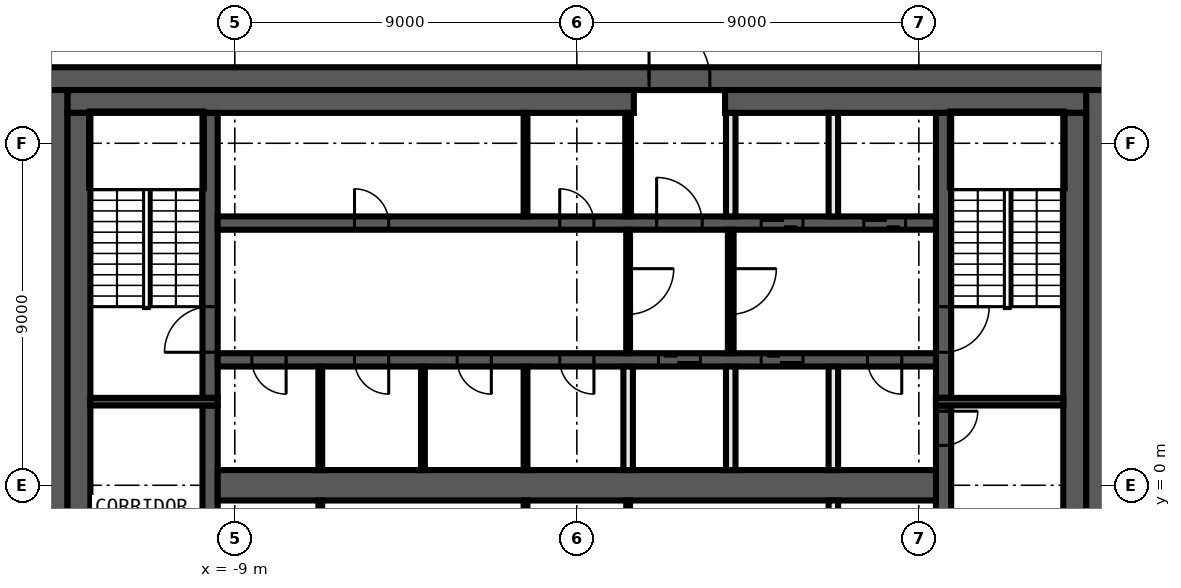
"""IFC4 building model, lengths in metres.
Left out: names, types, materials, properties, quantities, classifications, styles, units other than length and angle.
Written with IfcOpenShell. Run it as: python <this file> out.ifc"""

import sys

from ifc_helpers import new_model, si_unit, direction, frame, frame_2d, origin, place, context, subcontext, project, spatial, rectangle, extrude, element, fill, save


model = new_model("IFC4")
c1 = context("Model", 3, precision=1e-05, world=origin(), true_north=direction((0.0, 1.0)))
c2 = subcontext(c1, "Body", "Model", "MODEL_VIEW")
j1 = project(units=[si_unit("LENGTHUNIT", "METRE"), si_unit("PLANEANGLEUNIT", "RADIAN")], contexts=[c1])
p1 = place(None, origin())
s1 = spatial("IfcSite", under=j1, at=p1, CompositionType="ELEMENT")
p2 = place(p1, origin())
s2 = spatial("IfcBuilding", under=s1, at=p2, CompositionType="ELEMENT")
p3 = place(p2, frame((0.0, 0.0, 332.0)))
s3 = spatial("IfcBuildingStorey", under=s2, at=p3, CompositionType="ELEMENT", Elevation=332.0)
p4 = place(p3, frame((-14.0, 10.7, 0.0), z_axis=(0.0, 0.0, 1.0), x_axis=(1.0, 0.0, 0.0)))
e1 = element("IfcWall", 1, at=p4, inside=s3, PredefinedType="SHEAR", context=c2, shape_type="SweptSolid", body=[
    extrude(rectangle(XDim=28.0, YDim=0.6, at=frame_2d((14.0, 0.0))), origin(), (0.0, 0.0, 1.0), 3.82),
])
p5 = place(p4, frame((15.9, 0.0, 0.0)))
e2 = element("IfcOpeningElement", 2, at=p5, cuts=e1, PredefinedType="OPENING", context=c2, shape_type="SweptSolid", body=[
    extrude(rectangle(XDim=1.6, YDim=2.1, at=frame_2d((0.8, 1.05))), frame((0.0, 0.31, 0.0), z_axis=(0.0, -1.0, 0.0), x_axis=(1.0, 0.0, 0.0)), (0.0, 0.0, 1.0), 0.62),
])
for number, where, z_axis, x_axis in (
    (3, (13.7, 10.4, 0.0), (0.0, 0.0, 1.0), (0.0, -1.0, 0.0)),
    (4, (-13.7, -10.4, 0.0), (0.0, 0.0, 1.0), (0.0, 1.0, 0.0)),
):
    element("IfcWall", number, at=place(p3, frame(where, z_axis=z_axis, x_axis=x_axis)), inside=s3, PredefinedType="SHEAR", context=c2, shape_type="SweptSolid", body=[
        extrude(rectangle(XDim=20.8, YDim=0.6, at=frame_2d((10.4, 0.0))), origin(), (0.0, 0.0, 1.0), 3.82),
    ])
p6 = place(p3, frame((-13.4, 10.1, 0.0), z_axis=(0.0, 0.0, 1.0), x_axis=(1.0, 0.0, 0.0)))
e5 = element("IfcWall", 5, at=p6, inside=s3, PredefinedType="SHEAR", context=c2, shape_type="SweptSolid", body=[
    extrude(rectangle(XDim=14.9, YDim=0.6, at=frame_2d((7.45, 0.0))), origin(), (0.0, 0.0, 1.0), 3.82),
])
p7 = place(p3, frame((3.9, 10.1, 0.0), z_axis=(0.0, 0.0, 1.0), x_axis=(1.0, 0.0, 0.0)))
e6 = element("IfcWall", 6, at=p7, inside=s3, PredefinedType="SHEAR", context=c2, shape_type="SweptSolid", body=[
    extrude(rectangle(XDim=9.5, YDim=0.6, at=frame_2d((4.75, 0.0))), origin(), (0.0, 0.0, 1.0), 3.82),
])
for number, where, z_axis, x_axis in (
    (7, (13.1, 9.8, 0.0), (0.0, 0.0, 1.0), (0.0, -1.0, 0.0)),
    (8, (-13.1, -9.8, 0.0), (0.0, 0.0, 1.0), (0.0, 1.0, 0.0)),
):
    element("IfcWall", number, at=place(p3, frame(where, z_axis=z_axis, x_axis=x_axis)), inside=s3, PredefinedType="SHEAR", context=c2, shape_type="SweptSolid", body=[
        extrude(rectangle(XDim=19.6, YDim=0.6, at=frame_2d((9.8, 0.0))), origin(), (0.0, 0.0, 1.0), 3.82),
    ])
p8 = place(p3, frame((9.65, 2.1, 0.0), z_axis=(0.0, 0.0, 1.0), x_axis=(0.0, -1.0, 0.0)))
e9 = element("IfcWall", 9, at=p8, inside=s3, PredefinedType="SHEAR", context=c2, shape_type="SweptSolid", body=[
    extrude(rectangle(XDim=4.2, YDim=0.4, at=frame_2d((2.1, 0.0))), origin(), (0.0, 0.0, 1.0), 3.82),
])
p9 = place(p8, frame((0.15, 0.0, 0.0)))
e10 = element("IfcOpeningElement", 10, at=p9, cuts=e9, PredefinedType="OPENING", context=c2, shape_type="SweptSolid", body=[
    extrude(rectangle(XDim=0.9, YDim=2.1, at=frame_2d((0.45, 1.05))), frame((0.0, 0.21, 0.0), z_axis=(0.0, -1.0, 0.0), x_axis=(1.0, 0.0, 0.0)), (0.0, 0.0, 1.0), 0.42),
])
p10 = place(p3, frame((9.65, 9.8, 0.0), z_axis=(0.0, 0.0, 1.0), x_axis=(0.0, -1.0, 0.0)))
e11 = element("IfcWall", 11, at=p10, inside=s3, PredefinedType="SHEAR", context=c2, shape_type="SweptSolid", body=[
    extrude(rectangle(XDim=7.5, YDim=0.4, at=frame_2d((3.75, 0.0))), origin(), (0.0, 0.0, 1.0), 3.82),
])
p11 = place(p10, frame((5.1, 0.0, 0.0)))
e12 = element("IfcOpeningElement", 12, at=p11, cuts=e11, PredefinedType="OPENING", context=c2, shape_type="SweptSolid", body=[
    extrude(rectangle(XDim=1.2, YDim=2.1, at=frame_2d((0.6, 1.05))), frame((0.0, 0.21, 0.0), z_axis=(0.0, -1.0, 0.0), x_axis=(1.0, 0.0, 0.0)), (0.0, 0.0, 1.0), 0.42),
])
p12 = place(p3, frame((-9.65, -2.1, 0.0), z_axis=(0.0, 0.0, 1.0), x_axis=(0.0, 1.0, 0.0)))
e13 = element("IfcWall", 13, at=p12, inside=s3, PredefinedType="SHEAR", context=c2, shape_type="SweptSolid", body=[
    extrude(rectangle(XDim=4.2, YDim=0.4, at=frame_2d((2.1, 0.0))), origin(), (0.0, 0.0, 1.0), 3.82),
])
p13 = place(p3, frame((-9.65, 2.3, 0.0), z_axis=(0.0, 0.0, 1.0), x_axis=(0.0, 1.0, 0.0)))
e14 = element("IfcWall", 14, at=p13, inside=s3, PredefinedType="SHEAR", context=c2, shape_type="SweptSolid", body=[
    extrude(rectangle(XDim=7.5, YDim=0.4, at=frame_2d((3.75, 0.0))), origin(), (0.0, 0.0, 1.0), 3.82),
])
p14 = place(p13, frame((1.2, 0.0, 0.0)))
e15 = element("IfcOpeningElement", 15, at=p14, cuts=e14, PredefinedType="OPENING", context=c2, shape_type="SweptSolid", body=[
    extrude(rectangle(XDim=1.2, YDim=2.1, at=frame_2d((0.6, 1.05))), frame((0.0, 0.21, 0.0), z_axis=(0.0, -1.0, 0.0), x_axis=(1.0, 0.0, 0.0)), (0.0, 0.0, 1.0), 0.42),
])
for number, where, z_axis, x_axis in (
    (16, (9.45, 2.2, 0.0), (0.0, 0.0, 1.0), (1.0, 0.0, 0.0)),
    (17, (-9.45, 2.2, 0.0), (0.0, 0.0, 1.0), (-1.0, 0.0, 0.0)),
):
    element("IfcWall", number, at=place(p3, frame(where, z_axis=z_axis, x_axis=x_axis)), inside=s3, PredefinedType="SHEAR", context=c2, shape_type="SweptSolid", body=[
        extrude(rectangle(XDim=3.35, YDim=0.2, at=frame_2d((1.675, 0.0))), origin(), (0.0, 0.0, 1.0), 3.82),
    ])
p15 = place(p3, frame((-9.45, 6.9, 0.0), z_axis=(0.0, 0.0, 1.0), x_axis=(1.0, 0.0, 0.0)))
e18 = element("IfcWall", 18, at=p15, inside=s3, PredefinedType="SHEAR", context=c2, shape_type="SweptSolid", body=[
    extrude(rectangle(XDim=18.9, YDim=0.35, at=frame_2d((9.45, 0.0))), origin(), (0.0, 0.0, 1.0), 3.82),
])
p16 = place(p15, frame((11.55, 0.0, 0.0)))
e19 = element("IfcOpeningElement", 19, at=p16, cuts=e18, PredefinedType="OPENING", context=c2, shape_type="SweptSolid", body=[
    extrude(rectangle(XDim=1.2, YDim=2.1, at=frame_2d((0.6, 1.05))), frame((0.0, 0.185, 0.0), z_axis=(0.0, -1.0, 0.0), x_axis=(1.0, 0.0, 0.0)), (0.0, 0.0, 1.0), 0.37),
])
p17 = place(p15, frame((14.3, 0.0, 0.0)))
e20 = element("IfcOpeningElement", 20, at=p17, cuts=e18, PredefinedType="OPENING", context=c2, shape_type="SweptSolid", body=[
    extrude(rectangle(XDim=1.1, YDim=2.1, at=frame_2d((0.55, 1.05))), frame((0.0, 0.185, 0.0), z_axis=(0.0, -1.0, 0.0), x_axis=(1.0, 0.0, 0.0)), (0.0, 0.0, 1.0), 0.37),
])
p18 = place(p15, frame((17.0, 0.0, 0.0)))
e21 = element("IfcOpeningElement", 21, at=p18, cuts=e18, PredefinedType="OPENING", context=c2, shape_type="SweptSolid", body=[
    extrude(rectangle(XDim=1.1, YDim=2.1, at=frame_2d((0.55, 1.05))), frame((0.0, 0.185, 0.0), z_axis=(0.0, -1.0, 0.0), x_axis=(1.0, 0.0, 0.0)), (0.0, 0.0, 1.0), 0.37),
])
p19 = place(p15, frame((3.6, 0.0, 0.0)))
e22 = element("IfcOpeningElement", 22, at=p19, cuts=e18, PredefinedType="OPENING", context=c2, shape_type="SweptSolid", body=[
    extrude(rectangle(XDim=0.9, YDim=2.1, at=frame_2d((0.45, 1.05))), frame((0.0, 0.185, 0.0), z_axis=(0.0, -1.0, 0.0), x_axis=(1.0, 0.0, 0.0)), (0.0, 0.0, 1.0), 0.37),
])
p20 = place(p15, frame((9.0, 0.0, 0.0)))
e23 = element("IfcOpeningElement", 23, at=p20, cuts=e18, PredefinedType="OPENING", context=c2, shape_type="SweptSolid", body=[
    extrude(rectangle(XDim=0.9, YDim=2.1, at=frame_2d((0.45, 1.05))), frame((0.0, 0.185, 0.0), z_axis=(0.0, -1.0, 0.0), x_axis=(1.0, 0.0, 0.0)), (0.0, 0.0, 1.0), 0.37),
])
p21 = place(p3, frame((9.45, 3.3, 0.0), z_axis=(0.0, 0.0, 1.0), x_axis=(-1.0, 0.0, 0.0)))
e24 = element("IfcWall", 24, at=p21, inside=s3, PredefinedType="SHEAR", context=c2, shape_type="SweptSolid", body=[
    extrude(rectangle(XDim=18.9, YDim=0.35, at=frame_2d((9.45, 0.0))), origin(), (0.0, 0.0, 1.0), 3.82),
])
p22 = place(p21, frame((6.2, 0.0, 0.0)))
e25 = element("IfcOpeningElement", 25, at=p22, cuts=e24, PredefinedType="OPENING", context=c2, shape_type="SweptSolid", body=[
    extrude(rectangle(XDim=1.1, YDim=2.1, at=frame_2d((0.55, 1.05))), frame((0.0, 0.185, 0.0), z_axis=(0.0, -1.0, 0.0), x_axis=(1.0, 0.0, 0.0)), (0.0, 0.0, 1.0), 0.37),
])
p23 = place(p21, frame((3.5, 0.0, 0.0)))
e26 = element("IfcOpeningElement", 26, at=p23, cuts=e24, PredefinedType="OPENING", context=c2, shape_type="SweptSolid", body=[
    extrude(rectangle(XDim=1.1, YDim=2.1, at=frame_2d((0.55, 1.05))), frame((0.0, 0.185, 0.0), z_axis=(0.0, -1.0, 0.0), x_axis=(1.0, 0.0, 0.0)), (0.0, 0.0, 1.0), 0.37),
])
p24 = place(p21, frame((0.9, 0.0, 0.0)))
e27 = element("IfcOpeningElement", 27, at=p24, cuts=e24, PredefinedType="OPENING", context=c2, shape_type="SweptSolid", body=[
    extrude(rectangle(XDim=0.9, YDim=2.1, at=frame_2d((0.45, 1.05))), frame((0.0, 0.185, 0.0), z_axis=(0.0, -1.0, 0.0), x_axis=(1.0, 0.0, 0.0)), (0.0, 0.0, 1.0), 0.37),
])
p25 = place(p21, frame((17.1, 0.0, 0.0)))
e28 = element("IfcOpeningElement", 28, at=p25, cuts=e24, PredefinedType="OPENING", context=c2, shape_type="SweptSolid", body=[
    extrude(rectangle(XDim=0.9, YDim=2.1, at=frame_2d((0.45, 1.05))), frame((0.0, 0.185, 0.0), z_axis=(0.0, -1.0, 0.0), x_axis=(1.0, 0.0, 0.0)), (0.0, 0.0, 1.0), 0.37),
])
p26 = place(p21, frame((14.4, 0.0, 0.0)))
e29 = element("IfcOpeningElement", 29, at=p26, cuts=e24, PredefinedType="OPENING", context=c2, shape_type="SweptSolid", body=[
    extrude(rectangle(XDim=0.9, YDim=2.1, at=frame_2d((0.45, 1.05))), frame((0.0, 0.185, 0.0), z_axis=(0.0, -1.0, 0.0), x_axis=(1.0, 0.0, 0.0)), (0.0, 0.0, 1.0), 0.37),
])
p27 = place(p21, frame((11.7, 0.0, 0.0)))
e30 = element("IfcOpeningElement", 30, at=p27, cuts=e24, PredefinedType="OPENING", context=c2, shape_type="SweptSolid", body=[
    extrude(rectangle(XDim=0.9, YDim=2.1, at=frame_2d((0.45, 1.05))), frame((0.0, 0.185, 0.0), z_axis=(0.0, -1.0, 0.0), x_axis=(1.0, 0.0, 0.0)), (0.0, 0.0, 1.0), 0.37),
])
p28 = place(p21, frame((9.0, 0.0, 0.0)))
e31 = element("IfcOpeningElement", 31, at=p28, cuts=e24, PredefinedType="OPENING", context=c2, shape_type="SweptSolid", body=[
    extrude(rectangle(XDim=0.9, YDim=2.1, at=frame_2d((0.45, 1.05))), frame((0.0, 0.185, 0.0), z_axis=(0.0, -1.0, 0.0), x_axis=(1.0, 0.0, 0.0)), (0.0, 0.0, 1.0), 0.37),
])
p29 = place(p3, frame((-9.45, 0.0, 0.0), z_axis=(0.0, 0.0, 1.0), x_axis=(1.0, 0.0, 0.0)))
e32 = element("IfcWall", 32, at=p29, inside=s3, PredefinedType="SHEAR", context=c2, shape_type="SweptSolid", body=[
    extrude(rectangle(XDim=18.9, YDim=0.8, at=frame_2d((9.45, 0.0))), origin(), (0.0, 0.0, 1.0), 3.82),
])
for number, where, z_axis, x_axis in (
    (33, (6.75, -3.125, 0.0), (0.0, 0.0, 1.0), (0.0, 1.0, 0.0)),
    (34, (6.75, 0.4, 0.0), (0.0, 0.0, 1.0), (0.0, 1.0, 0.0)),
    (35, (6.75, 7.075, 0.0), (0.0, 0.0, 1.0), (0.0, 1.0, 0.0)),
):
    element("IfcWall", number, at=place(p3, frame(where, z_axis=z_axis, x_axis=x_axis)), inside=s3, PredefinedType="SOLIDWALL", context=c2, shape_type="SweptSolid", body=[
        extrude(rectangle(XDim=2.725, YDim=0.25, at=frame_2d((1.363, 0.0))), origin(), (0.0, 0.0, 1.0), 3.82),
    ])
p30 = place(p3, frame((4.05, 6.725, 0.0), z_axis=(0.0, 0.0, 1.0), x_axis=(0.0, -1.0, 0.0)))
e36 = element("IfcWall", 36, at=p30, inside=s3, PredefinedType="PARTITIONING", context=c2, shape_type="SweptSolid", body=[
    extrude(rectangle(XDim=3.25, YDim=0.15, at=frame_2d((1.625, 0.0))), origin(), (0.0, 0.0, 1.0), 3.82),
])
p31 = place(p30, frame((1.025, 0.0, 0.0)))
e37 = element("IfcOpeningElement", 37, at=p31, cuts=e36, PredefinedType="OPENING", context=c2, shape_type="SweptSolid", body=[
    extrude(rectangle(XDim=1.2, YDim=2.1, at=frame_2d((0.6, 1.05))), frame((0.0, 0.085, 0.0), z_axis=(0.0, -1.0, 0.0), x_axis=(1.0, 0.0, 0.0)), (0.0, 0.0, 1.0), 0.17),
])
for number, where, z_axis, x_axis in (
    (38, (4.05, 0.4, 0.0), (0.0, 0.0, 1.0), (0.0, 1.0, 0.0)),
    (39, (4.05, 7.075, 0.0), (0.0, 0.0, 1.0), (0.0, 1.0, 0.0)),
):
    element("IfcWall", number, at=place(p3, frame(where, z_axis=z_axis, x_axis=x_axis)), inside=s3, PredefinedType="SOLIDWALL", context=c2, shape_type="SweptSolid", body=[
        extrude(rectangle(XDim=2.725, YDim=0.25, at=frame_2d((1.363, 0.0))), origin(), (0.0, 0.0, 1.0), 3.82),
    ])
p32 = place(p3, frame((1.35, 7.075, 0.0), z_axis=(0.0, 0.0, 1.0), x_axis=(0.0, 1.0, 0.0)))
e40 = element("IfcWall", 40, at=p32, inside=s3, PredefinedType="PARTITIONING", context=c2, shape_type="SweptSolid", body=[
    extrude(rectangle(XDim=2.725, YDim=0.15, at=frame_2d((1.363, 0.0))), origin(), (0.0, 0.0, 1.0), 3.82),
])
p33 = place(p3, frame((1.35, -3.125, 0.0), z_axis=(0.0, 0.0, 1.0), x_axis=(0.0, 1.0, 0.0)))
e41 = element("IfcWall", 41, at=p33, inside=s3, PredefinedType="PARTITIONING", context=c2, shape_type="SweptSolid", body=[
    extrude(rectangle(XDim=2.725, YDim=0.1, at=frame_2d((1.363, 0.0))), origin(), (0.0, 0.0, 1.0), 3.82),
])
p34 = place(p3, frame((1.35, 6.725, 0.0), z_axis=(0.0, 0.0, 1.0), x_axis=(0.0, -1.0, 0.0)))
e42 = element("IfcWall", 42, at=p34, inside=s3, PredefinedType="PARTITIONING", context=c2, shape_type="SweptSolid", body=[
    extrude(rectangle(XDim=3.25, YDim=0.1, at=frame_2d((1.625, 0.0))), origin(), (0.0, 0.0, 1.0), 3.82),
])
p35 = place(p34, frame((1.025, 0.0, 0.0)))
e43 = element("IfcOpeningElement", 43, at=p35, cuts=e42, PredefinedType="OPENING", context=c2, shape_type="SweptSolid", body=[
    extrude(rectangle(XDim=1.2, YDim=2.1, at=frame_2d((0.6, 1.05))), frame((0.0, 0.06, 0.0), z_axis=(0.0, -1.0, 0.0), x_axis=(1.0, 0.0, 0.0)), (0.0, 0.0, 1.0), 0.12),
])
p36 = place(p3, frame((1.35, 0.4, 0.0), z_axis=(0.0, 0.0, 1.0), x_axis=(0.0, 1.0, 0.0)))
e44 = element("IfcWall", 44, at=p36, inside=s3, PredefinedType="SOLIDWALL", context=c2, shape_type="SweptSolid", body=[
    extrude(rectangle(XDim=2.725, YDim=0.25, at=frame_2d((1.363, 0.0))), origin(), (0.0, 0.0, 1.0), 3.82),
])
for number, where, z_axis, x_axis in (
    (45, (-1.35, -3.125, 0.0), (0.0, 0.0, 1.0), (0.0, 1.0, 0.0)),
    (46, (-1.35, 0.4, 0.0), (0.0, 0.0, 1.0), (0.0, 1.0, 0.0)),
    (47, (-1.35, 7.075, 0.0), (0.0, 0.0, 1.0), (0.0, 1.0, 0.0)),
    (48, (-4.05, 0.4, 0.0), (0.0, 0.0, 1.0), (0.0, 1.0, 0.0)),
    (49, (-6.75, -3.125, 0.0), (0.0, 0.0, 1.0), (0.0, 1.0, 0.0)),
    (50, (-6.75, 0.4, 0.0), (0.0, 0.0, 1.0), (0.0, 1.0, 0.0)),
):
    element("IfcWall", number, at=place(p3, frame(where, z_axis=z_axis, x_axis=x_axis)), inside=s3, PredefinedType="PARTITIONING", context=c2, shape_type="SweptSolid", body=[
        extrude(rectangle(XDim=2.725, YDim=0.1, at=frame_2d((1.363, 0.0))), origin(), (0.0, 0.0, 1.0), 3.82),
    ])
p37 = place(p9, origin())
e51 = element("IfcDoor", 51, at=p37, inside=s3, OperationType="SINGLE_SWING_RIGHT", PredefinedType="DOOR", context=c2, shape_type="SweptSolid", body=[
    extrude(rectangle(XDim=0.9, YDim=2.1, at=frame_2d((0.45, 1.05))), frame((0.0, 0.025, 0.0), z_axis=(0.0, -1.0, 0.0), x_axis=(1.0, 0.0, 0.0)), (0.0, 0.0, 1.0), 0.05),
])
fill(e10, e51)
p38 = place(p5, origin())
e52 = element("IfcDoor", 52, at=p38, inside=s3, OperationType="DOUBLE_DOOR_SINGLE_SWING", PredefinedType="DOOR", context=c2, shape_type="SweptSolid", body=[
    extrude(rectangle(XDim=1.6, YDim=2.1, at=frame_2d((0.8, 1.05))), frame((0.0, 0.025, 0.0), z_axis=(0.0, -1.0, 0.0), x_axis=(1.0, 0.0, 0.0)), (0.0, 0.0, 1.0), 0.05),
])
fill(e2, e52)
p39 = place(p16, origin())
e53 = element("IfcDoor", 53, at=p39, inside=s3, OperationType="SINGLE_SWING_LEFT", PredefinedType="DOOR", context=c2, shape_type="SweptSolid", body=[
    extrude(rectangle(XDim=1.2, YDim=2.1, at=frame_2d((0.6, 1.05))), frame((0.0, 0.025, 0.0), z_axis=(0.0, -1.0, 0.0), x_axis=(1.0, 0.0, 0.0)), (0.0, 0.0, 1.0), 0.05),
])
fill(e19, e53)
p40 = place(p17, origin())
e54 = element("IfcDoor", 54, at=p40, inside=s3, OperationType="DOUBLE_DOOR_SLIDING", PredefinedType="DOOR", context=c2, shape_type="SweptSolid", body=[
    extrude(rectangle(XDim=1.1, YDim=2.1, at=frame_2d((0.55, 1.05))), frame((0.0, 0.025, 0.0), z_axis=(0.0, -1.0, 0.0), x_axis=(1.0, 0.0, 0.0)), (0.0, 0.0, 1.0), 0.05),
])
fill(e20, e54)
p41 = place(p18, origin())
e55 = element("IfcDoor", 55, at=p41, inside=s3, OperationType="DOUBLE_DOOR_SLIDING", PredefinedType="DOOR", context=c2, shape_type="SweptSolid", body=[
    extrude(rectangle(XDim=1.1, YDim=2.1, at=frame_2d((0.55, 1.05))), frame((0.0, 0.025, 0.0), z_axis=(0.0, -1.0, 0.0), x_axis=(1.0, 0.0, 0.0)), (0.0, 0.0, 1.0), 0.05),
])
fill(e21, e55)
p42 = place(p22, origin())
e56 = element("IfcDoor", 56, at=p42, inside=s3, OperationType="DOUBLE_DOOR_SLIDING", PredefinedType="DOOR", context=c2, shape_type="SweptSolid", body=[
    extrude(rectangle(XDim=1.1, YDim=2.1, at=frame_2d((0.55, 1.05))), frame((0.0, 0.025, 0.0), z_axis=(0.0, -1.0, 0.0), x_axis=(1.0, 0.0, 0.0)), (0.0, 0.0, 1.0), 0.05),
])
fill(e25, e56)
p43 = place(p23, origin())
e57 = element("IfcDoor", 57, at=p43, inside=s3, OperationType="DOUBLE_DOOR_SLIDING", PredefinedType="DOOR", context=c2, shape_type="SweptSolid", body=[
    extrude(rectangle(XDim=1.1, YDim=2.1, at=frame_2d((0.55, 1.05))), frame((0.0, 0.025, 0.0), z_axis=(0.0, -1.0, 0.0), x_axis=(1.0, 0.0, 0.0)), (0.0, 0.0, 1.0), 0.05),
])
fill(e26, e57)
p44 = place(p24, origin())
e58 = element("IfcDoor", 58, at=p44, inside=s3, OperationType="SINGLE_SWING_LEFT", PredefinedType="DOOR", context=c2, shape_type="SweptSolid", body=[
    extrude(rectangle(XDim=0.9, YDim=2.1, at=frame_2d((0.45, 1.05))), frame((0.0, 0.025, 0.0), z_axis=(0.0, -1.0, 0.0), x_axis=(1.0, 0.0, 0.0)), (0.0, 0.0, 1.0), 0.05),
])
fill(e27, e58)
p45 = place(p19, origin())
e59 = element("IfcDoor", 59, at=p45, inside=s3, OperationType="SINGLE_SWING_RIGHT", PredefinedType="DOOR", context=c2, shape_type="SweptSolid", body=[
    extrude(rectangle(XDim=0.9, YDim=2.1, at=frame_2d((0.45, 1.05))), frame((0.0, 0.025, 0.0), z_axis=(0.0, -1.0, 0.0), x_axis=(1.0, 0.0, 0.0)), (0.0, 0.0, 1.0), 0.05),
])
fill(e22, e59)
p46 = place(p20, origin())
e60 = element("IfcDoor", 60, at=p46, inside=s3, OperationType="SINGLE_SWING_LEFT", PredefinedType="DOOR", context=c2, shape_type="SweptSolid", body=[
    extrude(rectangle(XDim=0.9, YDim=2.1, at=frame_2d((0.45, 1.05))), frame((0.0, 0.025, 0.0), z_axis=(0.0, -1.0, 0.0), x_axis=(1.0, 0.0, 0.0)), (0.0, 0.0, 1.0), 0.05),
])
fill(e23, e60)
p47 = place(p25, origin())
e61 = element("IfcDoor", 61, at=p47, inside=s3, OperationType="SINGLE_SWING_RIGHT", PredefinedType="DOOR", context=c2, shape_type="SweptSolid", body=[
    extrude(rectangle(XDim=0.9, YDim=2.1, at=frame_2d((0.45, 1.05))), frame((0.0, 0.025, 0.0), z_axis=(0.0, -1.0, 0.0), x_axis=(1.0, 0.0, 0.0)), (0.0, 0.0, 1.0), 0.05),
])
fill(e28, e61)
p48 = place(p26, origin())
e62 = element("IfcDoor", 62, at=p48, inside=s3, OperationType="SINGLE_SWING_LEFT", PredefinedType="DOOR", context=c2, shape_type="SweptSolid", body=[
    extrude(rectangle(XDim=0.9, YDim=2.1, at=frame_2d((0.45, 1.05))), frame((0.0, 0.025, 0.0), z_axis=(0.0, -1.0, 0.0), x_axis=(1.0, 0.0, 0.0)), (0.0, 0.0, 1.0), 0.05),
])
fill(e29, e62)
p49 = place(p27, origin())
e63 = element("IfcDoor", 63, at=p49, inside=s3, OperationType="SINGLE_SWING_RIGHT", PredefinedType="DOOR", context=c2, shape_type="SweptSolid", body=[
    extrude(rectangle(XDim=0.9, YDim=2.1, at=frame_2d((0.45, 1.05))), frame((0.0, 0.025, 0.0), z_axis=(0.0, -1.0, 0.0), x_axis=(1.0, 0.0, 0.0)), (0.0, 0.0, 1.0), 0.05),
])
fill(e30, e63)
p50 = place(p28, origin())
e64 = element("IfcDoor", 64, at=p50, inside=s3, OperationType="SINGLE_SWING_LEFT", PredefinedType="DOOR", context=c2, shape_type="SweptSolid", body=[
    extrude(rectangle(XDim=0.9, YDim=2.1, at=frame_2d((0.45, 1.05))), frame((0.0, 0.025, 0.0), z_axis=(0.0, -1.0, 0.0), x_axis=(1.0, 0.0, 0.0)), (0.0, 0.0, 1.0), 0.05),
])
fill(e31, e64)
p51 = place(p11, origin())
e65 = element("IfcDoor", 65, at=p51, inside=s3, OperationType="SINGLE_SWING_LEFT", PredefinedType="DOOR", context=c2, shape_type="SweptSolid", body=[
    extrude(rectangle(XDim=1.2, YDim=2.1, at=frame_2d((0.6, 1.05))), frame((0.0, 0.025, 0.0), z_axis=(0.0, -1.0, 0.0), x_axis=(1.0, 0.0, 0.0)), (0.0, 0.0, 1.0), 0.05),
])
fill(e12, e65)
p52 = place(p14, origin())
e66 = element("IfcDoor", 66, at=p52, inside=s3, OperationType="SINGLE_SWING_RIGHT", PredefinedType="DOOR", context=c2, shape_type="SweptSolid", body=[
    extrude(rectangle(XDim=1.2, YDim=2.1, at=frame_2d((0.6, 1.05))), frame((0.0, 0.025, 0.0), z_axis=(0.0, -1.0, 0.0), x_axis=(1.0, 0.0, 0.0)), (0.0, 0.0, 1.0), 0.05),
])
fill(e15, e66)
p53 = place(p35, origin())
e67 = element("IfcDoor", 67, at=p53, inside=s3, OperationType="SINGLE_SWING_LEFT", PredefinedType="DOOR", context=c2, shape_type="SweptSolid", body=[
    extrude(rectangle(XDim=1.2, YDim=2.1, at=frame_2d((0.6, 1.05))), frame((0.0, 0.025, 0.0), z_axis=(0.0, -1.0, 0.0), x_axis=(1.0, 0.0, 0.0)), (0.0, 0.0, 1.0), 0.05),
])
fill(e43, e67)
p54 = place(p31, origin())
e68 = element("IfcDoor", 68, at=p54, inside=s3, OperationType="SINGLE_SWING_RIGHT", PredefinedType="DOOR", context=c2, shape_type="SweptSolid", body=[
    extrude(rectangle(XDim=1.2, YDim=2.1, at=frame_2d((0.6, 1.05))), frame((0.0, 0.025, 0.0), z_axis=(0.0, -1.0, 0.0), x_axis=(1.0, 0.0, 0.0)), (0.0, 0.0, 1.0), 0.05),
])
fill(e37, e68)
save(model, sys.argv[1])
